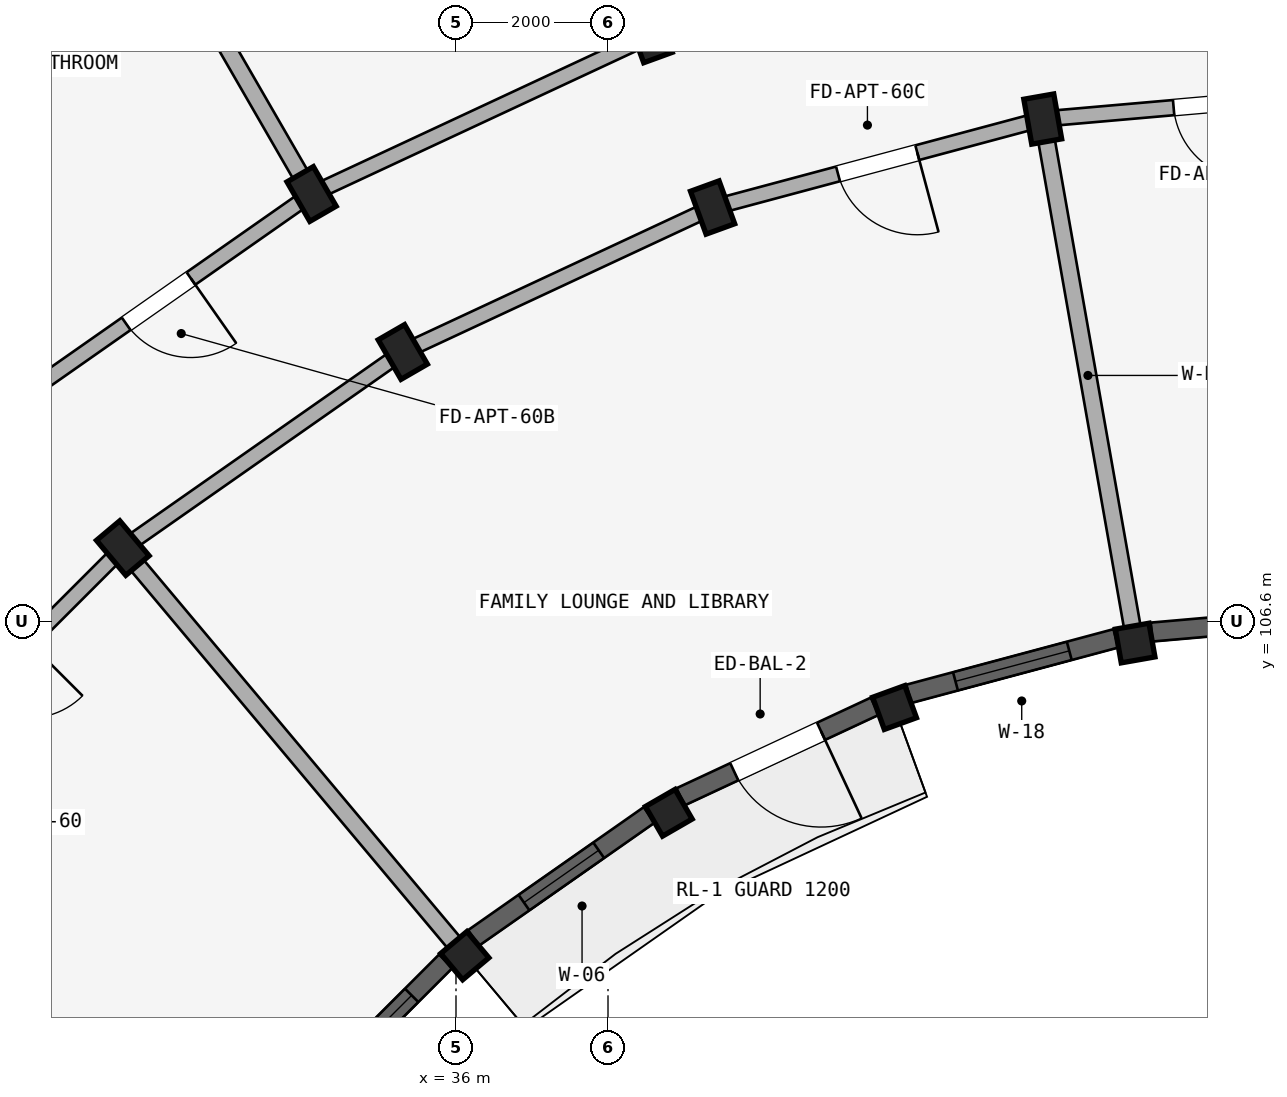
"""IFC4 building model, lengths in metres.
Left out: names, types, materials, properties, quantities, classifications, styles, units other than length and angle.
Written with IfcOpenShell. Run it as: python <this file> out.ifc"""

import sys

from ifc_helpers import new_model, si_unit, direction, frame, frame_2d, origin, origin_2d, place, context, subcontext, project, spatial, rectangle, extrude, element, fill, save


model = new_model("IFC4")
c1 = context("Model", 3, precision=1e-05, world=origin(), true_north=direction((0.0, 1.0)))
c2 = subcontext(c1, "Body", "Model", "MODEL_VIEW")
j1 = project(units=[si_unit("LENGTHUNIT", "METRE"), si_unit("PLANEANGLEUNIT", "RADIAN")], contexts=[c1])
p1 = place(None, origin())
s1 = spatial("IfcSite", under=j1, at=p1, CompositionType="ELEMENT")
p2 = place(p1, origin())
s2 = spatial("IfcBuilding", under=s1, at=p2, CompositionType="ELEMENT")
p3 = place(p2, frame((0.0, 0.0, 46.5)))
s3 = spatial("IfcBuildingStorey", under=s2, at=p3, CompositionType="ELEMENT", Elevation=46.5)
p4 = place(p3, frame((44.935, 106.314, 0.0), z_axis=(0.0, 0.0, 1.0), x_axis=(0.984807753012, 0.173648177667, 0.0)))
e1 = element("IfcColumn", 1, at=p4, inside=s3, PredefinedType="COLUMN", context=c2, shape_type="SweptSolid", body=[
    extrude(rectangle(XDim=0.45, YDim=0.45, at=origin_2d()), origin(), (0.0, 0.0, 1.0), 2.93),
])
p5 = place(p3, frame((43.72, 113.208, 0.0), z_axis=(0.0, 0.0, 1.0), x_axis=(0.984807753012, 0.173648177667, 0.0)))
e2 = element("IfcColumn", 2, at=p5, inside=s3, PredefinedType="COLUMN", context=c2, shape_type="SweptSolid", body=[
    extrude(rectangle(XDim=0.4, YDim=0.6, at=origin_2d()), origin(), (0.0, 0.0, 1.0), 2.93),
])
p6 = place(p3, frame((41.77, 105.466, 0.0), z_axis=(0.0, 0.0, 1.0), x_axis=(0.939692620786, 0.342020143326, 0.0)))
e3 = element("IfcColumn", 3, at=p6, inside=s3, PredefinedType="COLUMN", context=c2, shape_type="SweptSolid", body=[
    extrude(rectangle(XDim=0.45, YDim=0.45, at=origin_2d()), origin(), (0.0, 0.0, 1.0), 2.93),
])
for number, where, z_axis, x_axis in (
    (4, (39.376, 112.044, 0.0), (0.0, 0.0, 1.0), (0.94, 0.342, 0.0)),
    (5, (38.555, 114.299, 0.0), (0.0, 0.0, 1.0), (0.94, 0.342, 0.0)),
):
    element("IfcColumn", number, at=place(p3, frame(where, z_axis=z_axis, x_axis=x_axis)), inside=s3, PredefinedType="COLUMN", context=c2, shape_type="SweptSolid", body=[
        extrude(rectangle(XDim=0.4, YDim=0.6, at=origin_2d()), origin(), (0.0, 0.0, 1.0), 2.93),
    ])
p7 = place(p3, frame((38.8, 104.081, 0.0), z_axis=(0.0, 0.0, 1.0), x_axis=(0.866025403784, 0.5, 0.0)))
e6 = element("IfcColumn", 6, at=p7, inside=s3, PredefinedType="COLUMN", context=c2, shape_type="SweptSolid", body=[
    extrude(rectangle(XDim=0.45, YDim=0.45, at=origin_2d()), origin(), (0.0, 0.0, 1.0), 2.93),
])
for number, where, z_axis, x_axis in (
    (7, (35.3, 110.144, 0.0), (0.0, 0.0, 1.0), (0.866, 0.5, 0.0)),
    (8, (34.1, 112.222, 0.0), (0.0, 0.0, 1.0), (0.866, 0.5, 0.0)),
):
    element("IfcColumn", number, at=place(p3, frame(where, z_axis=z_axis, x_axis=x_axis)), inside=s3, PredefinedType="COLUMN", context=c2, shape_type="SweptSolid", body=[
        extrude(rectangle(XDim=0.4, YDim=0.6, at=origin_2d()), origin(), (0.0, 0.0, 1.0), 2.93),
    ])
p8 = place(p3, frame((36.115, 102.202, 0.0), z_axis=(0.0, 0.0, 1.0), x_axis=(0.766044443119, 0.642787609687, 0.0)))
e9 = element("IfcColumn", 9, at=p8, inside=s3, PredefinedType="COLUMN", context=c2, shape_type="SweptSolid", body=[
    extrude(rectangle(XDim=0.45, YDim=0.45, at=origin_2d()), origin(), (0.0, 0.0, 1.0), 2.93),
])
p9 = place(p3, frame((31.616, 107.564, 0.0), z_axis=(0.0, 0.0, 1.0), x_axis=(0.766044443119, 0.642787609687, 0.0)))
e10 = element("IfcColumn", 10, at=p9, inside=s3, PredefinedType="COLUMN", context=c2, shape_type="SweptSolid", body=[
    extrude(rectangle(XDim=0.4, YDim=0.6, at=origin_2d()), origin(), (0.0, 0.0, 1.0), 2.93),
])
p10 = place(p3, frame((48.2, 113.6, 0.0), z_axis=(0.0, 0.0, 1.0), x_axis=(-0.996191949488, -0.087187153726, 0.0)))
e11 = element("IfcWall", 11, at=p10, inside=s3, PredefinedType="STANDARD", context=c2, shape_type="SweptSolid", body=[
    extrude(rectangle(XDim=4.497, YDim=0.2, at=frame_2d((2.249, 0.0))), origin(), (0.0, 0.0, 1.0), 2.372),
])
p11 = place(p10, frame((1.729, 0.0, 0.0)))
e12 = element("IfcOpeningElement", 12, at=p11, cuts=e11, PredefinedType="OPENING", context=c2, shape_type="SweptSolid", body=[
    extrude(rectangle(XDim=1.04, YDim=2.15, at=frame_2d((0.52, 1.075))), frame((0.0, 0.11, 0.0), z_axis=(0.0, -1.0, 0.0), x_axis=(1.0, 0.0, 0.0)), (0.0, 0.0, 1.0), 0.22),
])
p12 = place(p3, frame((43.72, 113.208, 0.0), z_axis=(0.0, 0.0, 1.0), x_axis=(-0.965934240054, -0.258787642463, 0.0)))
e13 = element("IfcWall", 13, at=p12, inside=s3, PredefinedType="STANDARD", context=c2, shape_type="SweptSolid", body=[
    extrude(rectangle(XDim=4.497, YDim=0.2, at=frame_2d((2.249, 0.0))), origin(), (0.0, 0.0, 1.0), 2.372),
])
p13 = place(p12, frame((1.709, 0.0, 0.0)))
e14 = element("IfcOpeningElement", 14, at=p13, cuts=e13, PredefinedType="OPENING", context=c2, shape_type="SweptSolid", body=[
    extrude(rectangle(XDim=1.08, YDim=2.15, at=frame_2d((0.54, 1.075))), frame((0.0, 0.11, 0.0), z_axis=(0.0, -1.0, 0.0), x_axis=(1.0, 0.0, 0.0)), (0.0, 0.0, 1.0), 0.22),
])
p14 = place(p3, frame((39.376, 112.044, 0.0), z_axis=(0.0, 0.0, 1.0), x_axis=(-0.906307919131, -0.422617978463, 0.0)))
e15 = element("IfcWall", 15, at=p14, inside=s3, PredefinedType="STANDARD", context=c2, shape_type="SweptSolid", body=[
    extrude(rectangle(XDim=4.497, YDim=0.2, at=frame_2d((2.249, 0.0))), origin(), (0.0, 0.0, 1.0), 2.372),
])
p15 = place(p3, frame((38.555, 114.299, 0.0), z_axis=(0.0, 0.0, 1.0), x_axis=(-0.906302381024, -0.422629854778, 0.0)))
e16 = element("IfcWall", 16, at=p15, inside=s3, PredefinedType="STANDARD", context=c2, shape_type="SweptSolid", body=[
    extrude(rectangle(XDim=4.915, YDim=0.2, at=frame_2d((2.458, 0.0))), origin(), (0.0, 0.0, 1.0), 2.372),
])
p16 = place(p3, frame((35.3, 110.144, 0.0), z_axis=(0.0, 0.0, 1.0), x_axis=(-0.819155404658, -0.573571637217, 0.0)))
e17 = element("IfcWall", 17, at=p16, inside=s3, PredefinedType="STANDARD", context=c2, shape_type="SweptSolid", body=[
    extrude(rectangle(XDim=4.497, YDim=0.2, at=frame_2d((2.249, 0.0))), origin(), (0.0, 0.0, 1.0), 2.372),
])
p17 = place(p3, frame((34.1, 112.222, 0.0), z_axis=(0.0, 0.0, 1.0), x_axis=(-0.819140911474, -0.573592335331, 0.0)))
e18 = element("IfcWall", 18, at=p17, inside=s3, PredefinedType="STANDARD", context=c2, shape_type="SweptSolid", body=[
    extrude(rectangle(XDim=4.916, YDim=0.2, at=frame_2d((2.458, 0.0))), origin(), (0.0, 0.0, 1.0), 2.372),
])
p18 = place(p17, frame((1.938, 0.0, 0.0)))
e19 = element("IfcOpeningElement", 19, at=p18, cuts=e18, PredefinedType="OPENING", context=c2, shape_type="SweptSolid", body=[
    extrude(rectangle(XDim=1.04, YDim=2.15, at=frame_2d((0.52, 1.075))), frame((0.0, 0.11, 0.0), z_axis=(0.0, -1.0, 0.0), x_axis=(1.0, 0.0, 0.0)), (0.0, 0.0, 1.0), 0.22),
])
p19 = place(p3, frame((31.616, 107.564, 0.0), z_axis=(0.0, 0.0, 1.0), x_axis=(-0.707106781187, -0.707106781187, 0.0)))
e20 = element("IfcWall", 20, at=p19, inside=s3, PredefinedType="STANDARD", context=c2, shape_type="SweptSolid", body=[
    extrude(rectangle(XDim=4.497, YDim=0.2, at=frame_2d((2.249, 0.0))), origin(), (0.0, 0.0, 1.0), 2.372),
])
p20 = place(p19, frame((1.749, 0.0, 0.0)))
e21 = element("IfcOpeningElement", 21, at=p20, cuts=e20, PredefinedType="OPENING", context=c2, shape_type="SweptSolid", body=[
    extrude(rectangle(XDim=1.0, YDim=2.15, at=frame_2d((0.5, 1.075))), frame((0.0, 0.11, 0.0), z_axis=(0.0, -1.0, 0.0), x_axis=(1.0, 0.0, 0.0)), (0.0, 0.0, 1.0), 0.22),
])
p21 = place(p3, frame((44.901, 106.511, 0.0), z_axis=(0.0, 0.0, 1.0), x_axis=(-0.173647089161, 0.984807944945, 0.0)))
e22 = element("IfcWall", 22, at=p21, inside=s3, PredefinedType="STANDARD", context=c2, shape_type="SweptSolid", body=[
    extrude(rectangle(XDim=6.75, YDim=0.22, at=frame_2d((3.375, 0.0))), origin(), (0.0, 0.0, 1.0), 2.372),
])
p22 = place(p3, frame((34.05, 112.309, 0.0), z_axis=(0.0, 0.0, 1.0), x_axis=(-0.500002045973, 0.866024222538, 0.0)))
e23 = element("IfcWall", 23, at=p22, inside=s3, PredefinedType="STANDARD", context=c2, shape_type="SweptSolid", body=[
    extrude(rectangle(XDim=9.02, YDim=0.22, at=frame_2d((4.51, 0.0))), origin(), (0.0, 0.0, 1.0), 2.372),
])
p23 = place(p3, frame((35.987, 102.355, 0.0), z_axis=(0.0, 0.0, 1.0), x_axis=(-0.642784846501, 0.766046761698, 0.0)))
e24 = element("IfcWall", 24, at=p23, inside=s3, PredefinedType="STANDARD", context=c2, shape_type="SweptSolid", body=[
    extrude(rectangle(XDim=6.75, YDim=0.22, at=frame_2d((3.375, 0.0))), origin(), (0.0, 0.0, 1.0), 2.372),
])
p24 = place(p3, frame((47.751, 106.686, 0.0), z_axis=(0.0, 0.0, 1.0), x_axis=(-0.996188433092, -0.087227322402, 0.0)))
e25 = element("IfcWall", 25, at=p24, inside=s3, PredefinedType="STANDARD", context=c2, shape_type="SweptSolid", body=[
    extrude(rectangle(XDim=2.609, YDim=0.25, at=frame_2d((1.304, 0.0))), origin(), (0.0, 0.0, 1.0), 2.472),
])
p25 = place(p24, frame((0.599, 0.0, 0.772)))
e26 = element("IfcOpeningElement", 26, at=p25, cuts=e25, PredefinedType="OPENING", context=c2, shape_type="SweptSolid", body=[
    extrude(rectangle(XDim=1.2, YDim=1.5, at=frame_2d((0.6, 0.75))), frame((0.0, 0.135, 0.0), z_axis=(0.0, -1.0, 0.0), x_axis=(1.0, 0.0, 0.0)), (0.0, 0.0, 1.0), 0.27),
])
p26 = place(p3, frame((44.682, 106.376, 0.0), z_axis=(0.0, 0.0, 1.0), x_axis=(-0.965921001908, -0.258837049266, 0.0)))
e27 = element("IfcWall", 27, at=p26, inside=s3, PredefinedType="STANDARD", context=c2, shape_type="SweptSolid", body=[
    extrude(rectangle(XDim=2.82, YDim=0.25, at=frame_2d((1.41, 0.0))), origin(), (0.0, 0.0, 1.0), 2.472),
])
p27 = place(p26, frame((0.635, 0.0, 0.672)))
e28 = element("IfcOpeningElement", 28, at=p27, cuts=e27, PredefinedType="OPENING", context=c2, shape_type="SweptSolid", body=[
    extrude(rectangle(XDim=1.55, YDim=1.6, at=frame_2d((0.775, 0.8))), frame((0.0, 0.135, 0.0), z_axis=(0.0, -1.0, 0.0), x_axis=(1.0, 0.0, 0.0)), (0.0, 0.0, 1.0), 0.27),
])
p28 = place(p3, frame((41.51, 105.483, 0.0), z_axis=(0.0, 0.0, 1.0), x_axis=(-0.906284857185, -0.422667431484, 0.0)))
e29 = element("IfcWall", 29, at=p28, inside=s3, PredefinedType="STANDARD", context=c2, shape_type="SweptSolid", body=[
    extrude(rectangle(XDim=2.82, YDim=0.25, at=frame_2d((1.41, 0.0))), origin(), (0.0, 0.0, 1.0), 2.472),
])
p29 = place(p28, frame((0.78, 0.0, 0.0)))
e30 = element("IfcOpeningElement", 30, at=p29, cuts=e29, PredefinedType="OPENING", context=c2, shape_type="SweptSolid", body=[
    extrude(rectangle(XDim=1.26, YDim=2.15, at=frame_2d((0.63, 1.075))), frame((0.0, 0.135, 0.0), z_axis=(0.0, -1.0, 0.0), x_axis=(1.0, 0.0, 0.0)), (0.0, 0.0, 1.0), 0.27),
])
p30 = place(p3, frame((38.541, 104.053, 0.0), z_axis=(0.0, 0.0, 1.0), x_axis=(-0.819154644592, -0.573572722716, 0.0)))
e31 = element("IfcWall", 31, at=p30, inside=s3, PredefinedType="STANDARD", context=c2, shape_type="SweptSolid", body=[
    extrude(rectangle(XDim=2.82, YDim=0.25, at=frame_2d((1.41, 0.0))), origin(), (0.0, 0.0, 1.0), 2.472),
])
p31 = place(p30, frame((0.81, 0.0, 0.772)))
e32 = element("IfcOpeningElement", 32, at=p31, cuts=e31, PredefinedType="OPENING", context=c2, shape_type="SweptSolid", body=[
    extrude(rectangle(XDim=1.2, YDim=1.5, at=frame_2d((0.6, 0.75))), frame((0.0, 0.135, 0.0), z_axis=(0.0, -1.0, 0.0), x_axis=(1.0, 0.0, 0.0)), (0.0, 0.0, 1.0), 0.27),
])
p32 = place(p3, frame((35.866, 102.128, 0.0), z_axis=(0.0, 0.0, 1.0), x_axis=(-0.707106781187, -0.707106781187, 0.0)))
e33 = element("IfcWall", 33, at=p32, inside=s3, PredefinedType="STANDARD", context=c2, shape_type="SweptSolid", body=[
    extrude(rectangle(XDim=2.82, YDim=0.25, at=frame_2d((1.41, 0.0))), origin(), (0.0, 0.0, 1.0), 2.472),
])
p33 = place(p32, frame((0.635, 0.0, 0.672)))
e34 = element("IfcOpeningElement", 34, at=p33, cuts=e33, PredefinedType="OPENING", context=c2, shape_type="SweptSolid", body=[
    extrude(rectangle(XDim=1.55, YDim=1.6, at=frame_2d((0.775, 0.8))), frame((0.0, 0.135, 0.0), z_axis=(0.0, -1.0, 0.0), x_axis=(1.0, 0.0, 0.0)), (0.0, 0.0, 1.0), 0.27),
])
p34 = place(p27, origin())
e35 = element("IfcWindow", 35, at=p34, inside=s3, PartitioningType="DOUBLE_PANEL_VERTICAL", PredefinedType="WINDOW", context=c2, shape_type="SweptSolid", body=[
    extrude(rectangle(XDim=1.55, YDim=1.6, at=frame_2d((0.775, 0.8))), frame((0.0, 0.03, 0.0), z_axis=(0.0, -1.0, 0.0), x_axis=(1.0, 0.0, 0.0)), (0.0, 0.0, 1.0), 0.06),
])
fill(e28, e35)
p35 = place(p31, origin())
e36 = element("IfcWindow", 36, at=p35, inside=s3, PartitioningType="SINGLE_PANEL", PredefinedType="WINDOW", context=c2, shape_type="SweptSolid", body=[
    extrude(rectangle(XDim=1.2, YDim=1.5, at=frame_2d((0.6, 0.75))), frame((0.0, 0.03, 0.0), z_axis=(0.0, -1.0, 0.0), x_axis=(1.0, 0.0, 0.0)), (0.0, 0.0, 1.0), 0.06),
])
fill(e32, e36)
p36 = place(p33, origin())
e37 = element("IfcWindow", 37, at=p36, inside=s3, PartitioningType="DOUBLE_PANEL_VERTICAL", PredefinedType="WINDOW", context=c2, shape_type="SweptSolid", body=[
    extrude(rectangle(XDim=1.55, YDim=1.6, at=frame_2d((0.775, 0.8))), frame((0.0, 0.03, 0.0), z_axis=(0.0, -1.0, 0.0), x_axis=(1.0, 0.0, 0.0)), (0.0, 0.0, 1.0), 0.06),
])
fill(e34, e37)
p37 = place(p18, frame((1.04, 0.0, 0.0), z_axis=(0.0, 0.0, 1.0), x_axis=(-1.0, 0.0, 0.0)))
e38 = element("IfcDoor", 38, at=p37, inside=s3, OperationType="SINGLE_SWING_RIGHT", PredefinedType="DOOR", context=c2, shape_type="SweptSolid", body=[
    extrude(rectangle(XDim=1.04, YDim=2.15, at=frame_2d((0.52, 1.075))), frame((0.0, 0.025, 0.0), z_axis=(0.0, -1.0, 0.0), x_axis=(1.0, 0.0, 0.0)), (0.0, 0.0, 1.0), 0.05),
])
fill(e19, e38)
p38 = place(p11, frame((1.04, 0.0, 0.0), z_axis=(0.0, 0.0, 1.0), x_axis=(-1.0, 0.0, 0.0)))
e39 = element("IfcDoor", 39, at=p38, inside=s3, OperationType="SINGLE_SWING_RIGHT", PredefinedType="DOOR", context=c2, shape_type="SweptSolid", body=[
    extrude(rectangle(XDim=1.04, YDim=2.15, at=frame_2d((0.52, 1.075))), frame((0.0, 0.025, 0.0), z_axis=(0.0, -1.0, 0.0), x_axis=(1.0, 0.0, 0.0)), (0.0, 0.0, 1.0), 0.05),
])
fill(e12, e39)
p39 = place(p13, origin())
e40 = element("IfcDoor", 40, at=p39, inside=s3, OperationType="SINGLE_SWING_LEFT", PredefinedType="DOOR", context=c2, shape_type="SweptSolid", body=[
    extrude(rectangle(XDim=1.08, YDim=2.15, at=frame_2d((0.54, 1.075))), frame((0.0, 0.025, 0.0), z_axis=(0.0, -1.0, 0.0), x_axis=(1.0, 0.0, 0.0)), (0.0, 0.0, 1.0), 0.05),
])
fill(e14, e40)
p40 = place(p29, origin())
e41 = element("IfcDoor", 41, at=p40, inside=s3, OperationType="SINGLE_SWING_LEFT", PredefinedType="DOOR", context=c2, shape_type="SweptSolid", body=[
    extrude(rectangle(XDim=1.26, YDim=2.15, at=frame_2d((0.63, 1.075))), frame((0.0, 0.025, 0.0), z_axis=(0.0, -1.0, 0.0), x_axis=(1.0, 0.0, 0.0)), (0.0, 0.0, 1.0), 0.05),
])
fill(e30, e41)
save(model, sys.argv[1])
